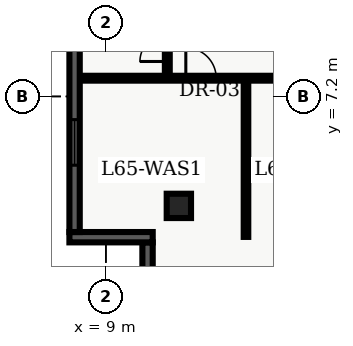
"""IFC4 building model, lengths in metres.
Left out: names, types, materials, properties, quantities, classifications, styles, units other than length and angle.
Written with IfcOpenShell. Run it as: python <this file> out.ifc"""

import sys

from ifc_helpers import new_model, entity, si_unit, converted_unit, direction, frame, origin_with_axes, origin_2d_with_axis, place, context, subcontext, project, spatial, polyline, rectangle, outline, extrude, element, fill, save


model = new_model("IFC4")
c1 = context("Model", 3, precision=1e-05, world=origin_with_axes(), true_north=direction((0.0, 1.0)))
c2 = subcontext(c1, "Body", "Model", "MODEL_VIEW")
j1 = project(units=[si_unit("LENGTHUNIT", "METRE"), converted_unit("PLANEANGLEUNIT", "DEGREE", entity("IfcPlaneAngleMeasure", 0.017), si_unit("PLANEANGLEUNIT", "RADIAN"), dimensions=[0, 0, 0, 0, 0, 0, 0])], contexts=[c1])
p1 = place(None, origin_with_axes())
s1 = spatial("IfcSite", under=j1, at=p1, CompositionType="ELEMENT")
p2 = place(p1, origin_with_axes())
s2 = spatial("IfcBuilding", under=s1, at=p2, CompositionType="ELEMENT")
p3 = place(p2, frame((0.0, 0.0, 264.6), z_axis=(0.0, 0.0, 1.0), x_axis=(1.0, 0.0, 0.0)))
s3 = spatial("IfcBuildingStorey", under=s2, at=p3, CompositionType="ELEMENT", Elevation=264.6)
p4 = place(p3, frame((11.4, 3.6, 0.0), z_axis=(0.0, 0.0, 1.0), x_axis=(1.0, 0.0, 0.0)))
e1 = element("IfcColumn", 1, at=p4, inside=s3, PredefinedType="COLUMN", context=c2, shape_type="SweptSolid", body=[
    extrude(rectangle(XDim=0.8, YDim=0.8, at=origin_2d_with_axis()), origin_with_axes(), (0.0, 0.0, 1.0), 3.9),
])
p5 = place(p3, frame((8.135, 7.8, 0.0), z_axis=(0.0, 0.0, 1.0), x_axis=(1.0, 0.0, 0.0)))
e2 = element("IfcWall", 2, at=p5, inside=s3, PredefinedType="PARTITIONING", context=c2, shape_type="SweptSolid", body=[
    extrude(outline(polyline([(0.0, -0.08), (12.165, -0.08), (12.165, 0.08), (0.0, 0.08), (0.0, -0.08)])), origin_with_axes(), (0.0, 0.0, 1.0), 2.7),
])
p6 = place(p5, frame((3.994, 0.0, 0.0), z_axis=(0.0, 0.0, 1.0), x_axis=(1.0, 0.0, 0.0)))
e3 = element("IfcOpeningElement", 3, at=p6, cuts=e2, PredefinedType="OPENING", context=c2, shape_type="SweptSolid", body=[
    extrude(rectangle(XDim=1.0, YDim=0.18, at=origin_2d_with_axis()), origin_with_axes(), (0.0, 0.0, 1.0), 2.15),
])
p7 = place(p5, frame((8.794, 0.0, 0.0), z_axis=(0.0, 0.0, 1.0), x_axis=(1.0, 0.0, 0.0)))
e4 = element("IfcOpeningElement", 4, at=p7, cuts=e2, PredefinedType="OPENING", context=c2, shape_type="SweptSolid", body=[
    extrude(rectangle(XDim=1.0, YDim=0.18, at=origin_2d_with_axis()), origin_with_axes(), (0.0, 0.0, 1.0), 2.15),
])
p8 = place(p3, frame((11.02, 7.8, 0.0), z_axis=(0.0, 0.0, 1.0), x_axis=(0.0, 1.0, 0.0)))
e5 = element("IfcWall", 5, at=p8, inside=s3, PredefinedType="PARTITIONING", context=c2, shape_type="SweptSolid", body=[
    extrude(outline(polyline([(0.0, -0.08), (2.85, -0.08), (2.85, 0.08), (0.0, 0.08), (0.0, -0.08)])), origin_with_axes(), (0.0, 0.0, 1.0), 2.7),
])
p9 = place(p8, frame((1.0, 0.0, 0.0), z_axis=(0.0, 0.0, 1.0), x_axis=(1.0, 0.0, 0.0)))
e6 = element("IfcOpeningElement", 6, at=p9, cuts=e5, PredefinedType="OPENING", context=c2, shape_type="SweptSolid", body=[
    extrude(rectangle(XDim=0.9, YDim=0.18, at=origin_2d_with_axis()), origin_with_axes(), (0.0, 0.0, 1.0), 2.15),
])
p10 = place(p3, frame((13.608, 2.58, 0.0), z_axis=(0.0, 0.0, 1.0), x_axis=(0.0, 1.0, 0.0)))
e7 = element("IfcWall", 7, at=p10, inside=s3, PredefinedType="PARTITIONING", context=c2, shape_type="SweptSolid", body=[
    extrude(outline(polyline([(0.0, -0.075), (5.12, -0.075), (5.12, 0.075), (0.0, 0.075), (0.0, -0.075)])), origin_with_axes(), (0.0, 0.0, 1.0), 2.7),
])
p11 = place(p3, frame((10.37, 0.34, 0.0), z_axis=(0.0, 0.0, 1.0), x_axis=(0.0, 1.0, 0.0)))
e8 = element("IfcWall", 8, at=p11, inside=s3, PredefinedType="SOLIDWALL", context=c2, shape_type="SweptSolid", body=[
    extrude(outline(polyline([(0.0, -0.17), (2.06, -0.17), (2.06, 0.17), (0.0, 0.17), (0.0, -0.17)])), origin_with_axes(), (0.0, 0.0, 1.0), 3.66),
])
p12 = place(p3, frame((10.54, 2.57, 0.0), z_axis=(0.0, 0.0, 1.0), x_axis=(-1.0, 0.0, 0.0)))
e9 = element("IfcWall", 9, at=p12, inside=s3, PredefinedType="SOLIDWALL", context=c2, shape_type="SweptSolid", body=[
    extrude(outline(polyline([(0.0, -0.17), (2.74, -0.17), (2.74, 0.17), (0.0, 0.17), (0.0, -0.17)])), origin_with_axes(), (0.0, 0.0, 1.0), 3.66),
])
p13 = place(p3, frame((7.97, 2.74, 0.0), z_axis=(0.0, 0.0, 1.0), x_axis=(0.0, 1.0, 0.0)))
e10 = element("IfcWall", 10, at=p13, inside=s3, PredefinedType="SOLIDWALL", context=c2, shape_type="SweptSolid", body=[
    extrude(outline(polyline([(0.0, -0.17), (43.46, -0.17), (43.46, 0.17), (0.0, 0.17), (0.0, -0.17)])), origin_with_axes(), (0.0, 0.0, 1.0), 3.66),
])
p14 = place(p13, frame((2.948, 0.0, 0.45), z_axis=(0.0, 0.0, 1.0), x_axis=(1.0, 0.0, 0.0)))
e11 = element("IfcOpeningElement", 11, at=p14, cuts=e10, PredefinedType="OPENING", context=c2, shape_type="SweptSolid", body=[
    extrude(rectangle(XDim=1.5, YDim=0.36, at=origin_2d_with_axis()), origin_with_axes(), (0.0, 0.0, 1.0), 2.1),
])
p15 = place(p13, frame((7.643, 0.0, 0.45), z_axis=(0.0, 0.0, 1.0), x_axis=(1.0, 0.0, 0.0)))
e12 = element("IfcOpeningElement", 12, at=p15, cuts=e10, PredefinedType="OPENING", context=c2, shape_type="SweptSolid", body=[
    extrude(rectangle(XDim=1.5, YDim=0.36, at=origin_2d_with_axis()), origin_with_axes(), (0.0, 0.0, 1.0), 2.1),
])
p16 = place(p13, frame((12.339, 0.0, 0.45), z_axis=(0.0, 0.0, 1.0), x_axis=(1.0, 0.0, 0.0)))
e13 = element("IfcOpeningElement", 13, at=p16, cuts=e10, PredefinedType="OPENING", context=c2, shape_type="SweptSolid", body=[
    extrude(rectangle(XDim=1.5, YDim=0.36, at=origin_2d_with_axis()), origin_with_axes(), (0.0, 0.0, 1.0), 2.1),
])
p17 = place(p13, frame((17.034, 0.0, 0.45), z_axis=(0.0, 0.0, 1.0), x_axis=(1.0, 0.0, 0.0)))
e14 = element("IfcOpeningElement", 14, at=p17, cuts=e10, PredefinedType="OPENING", context=c2, shape_type="SweptSolid", body=[
    extrude(rectangle(XDim=1.5, YDim=0.36, at=origin_2d_with_axis()), origin_with_axes(), (0.0, 0.0, 1.0), 2.1),
])
p18 = place(p13, frame((22.58, 0.0, 0.45), z_axis=(0.0, 0.0, 1.0), x_axis=(1.0, 0.0, 0.0)))
e15 = element("IfcOpeningElement", 15, at=p18, cuts=e10, PredefinedType="OPENING", context=c2, shape_type="SweptSolid", body=[
    extrude(rectangle(XDim=1.5, YDim=0.36, at=origin_2d_with_axis()), origin_with_axes(), (0.0, 0.0, 1.0), 2.1),
])
p19 = place(p13, frame((26.426, 0.0, 0.45), z_axis=(0.0, 0.0, 1.0), x_axis=(1.0, 0.0, 0.0)))
e16 = element("IfcOpeningElement", 16, at=p19, cuts=e10, PredefinedType="OPENING", context=c2, shape_type="SweptSolid", body=[
    extrude(rectangle(XDim=1.5, YDim=0.36, at=origin_2d_with_axis()), origin_with_axes(), (0.0, 0.0, 1.0), 2.1),
])
p20 = place(p13, frame((31.121, 0.0, 0.45), z_axis=(0.0, 0.0, 1.0), x_axis=(1.0, 0.0, 0.0)))
e17 = element("IfcOpeningElement", 17, at=p20, cuts=e10, PredefinedType="OPENING", context=c2, shape_type="SweptSolid", body=[
    extrude(rectangle(XDim=1.5, YDim=0.36, at=origin_2d_with_axis()), origin_with_axes(), (0.0, 0.0, 1.0), 2.1),
])
p21 = place(p13, frame((35.817, 0.0, 0.45), z_axis=(0.0, 0.0, 1.0), x_axis=(1.0, 0.0, 0.0)))
e18 = element("IfcOpeningElement", 18, at=p21, cuts=e10, PredefinedType="OPENING", context=c2, shape_type="SweptSolid", body=[
    extrude(rectangle(XDim=1.5, YDim=0.36, at=origin_2d_with_axis()), origin_with_axes(), (0.0, 0.0, 1.0), 2.1),
])
p22 = place(p13, frame((40.512, 0.0, 0.45), z_axis=(0.0, 0.0, 1.0), x_axis=(1.0, 0.0, 0.0)))
e19 = element("IfcOpeningElement", 19, at=p22, cuts=e10, PredefinedType="OPENING", context=c2, shape_type="SweptSolid", body=[
    extrude(rectangle(XDim=1.5, YDim=0.36, at=origin_2d_with_axis()), origin_with_axes(), (0.0, 0.0, 1.0), 2.1),
])
p23 = place(p8, frame((1.0, 0.0, 0.0), z_axis=(0.0, 0.0, 1.0), x_axis=(1.0, 0.0, 0.0)))
e20 = element("IfcDoor", 20, at=p23, inside=s3, OperationType="SINGLE_SWING_LEFT", PredefinedType="DOOR", context=c2, shape_type="SweptSolid", body=[
    extrude(rectangle(XDim=0.9, YDim=0.09, at=origin_2d_with_axis()), origin_with_axes(), (0.0, 0.0, 1.0), 2.15),
])
fill(e6, e20)
p24 = place(p5, frame((3.994, 0.0, 0.0), z_axis=(0.0, 0.0, 1.0), x_axis=(1.0, 0.0, 0.0)))
e21 = element("IfcDoor", 21, at=p24, inside=s3, OperationType="SINGLE_SWING_LEFT", PredefinedType="DOOR", context=c2, shape_type="SweptSolid", body=[
    extrude(rectangle(XDim=1.0, YDim=0.09, at=origin_2d_with_axis()), origin_with_axes(), (0.0, 0.0, 1.0), 2.15),
])
fill(e3, e21)
p25 = place(p13, frame((2.948, 0.0, 0.45), z_axis=(0.0, 0.0, 1.0), x_axis=(1.0, 0.0, 0.0)))
e22 = element("IfcWindow", 22, at=p25, inside=s3, PredefinedType="WINDOW", context=c2, shape_type="SweptSolid", body=[
    extrude(rectangle(XDim=1.5, YDim=0.09, at=origin_2d_with_axis()), origin_with_axes(), (0.0, 0.0, 1.0), 2.1),
])
fill(e11, e22)
save(model, sys.argv[1])
